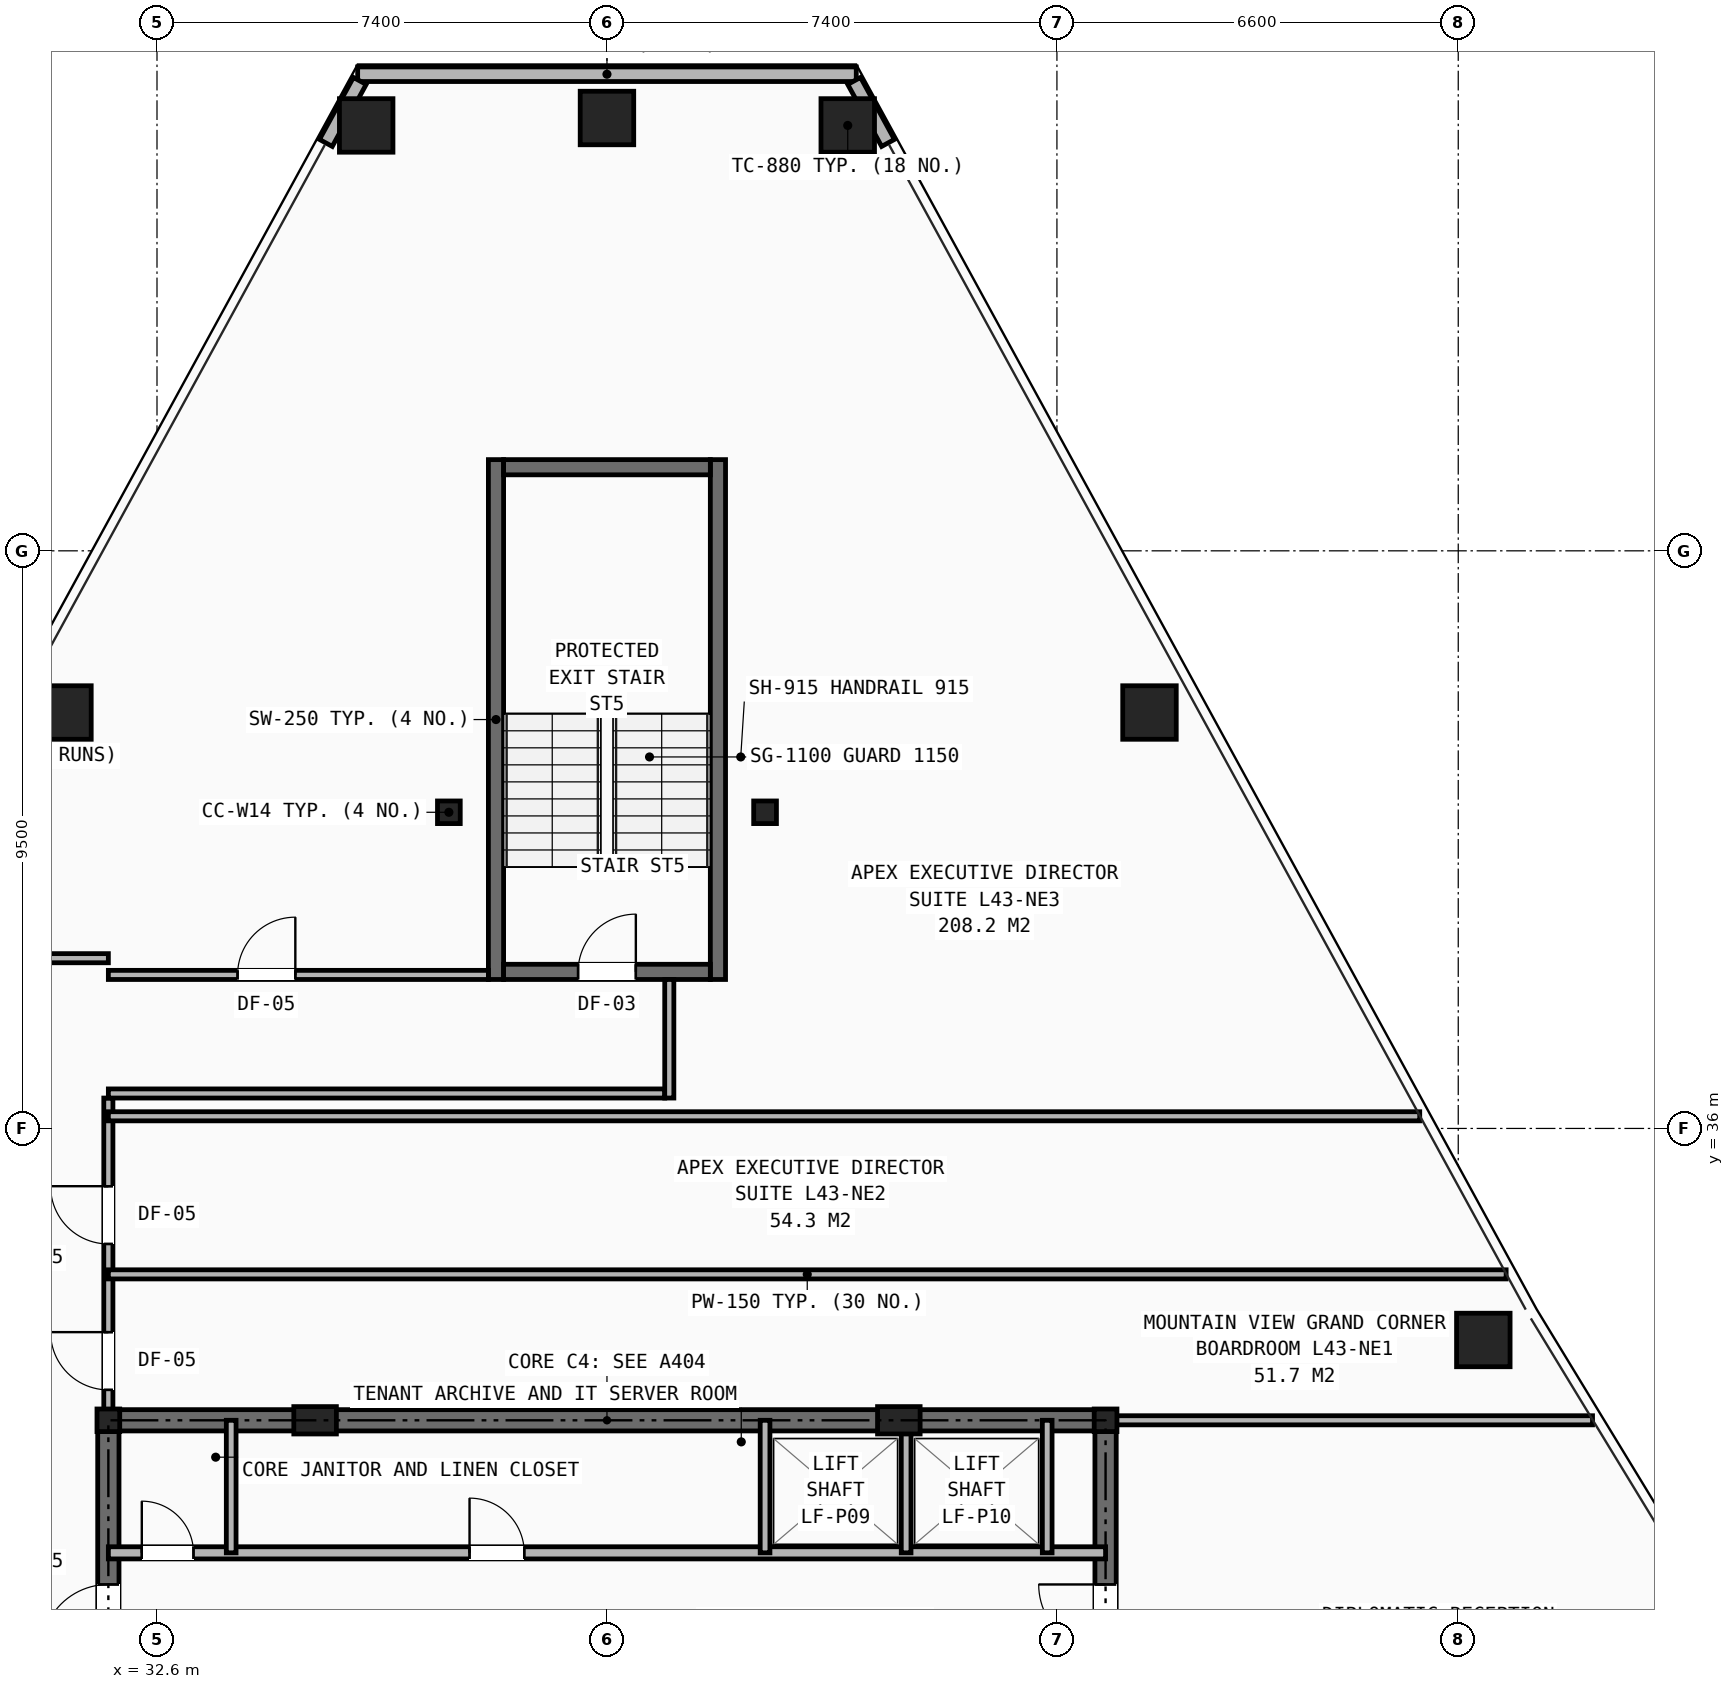
"""IFC4 building model, lengths in metres.
Left out: names, types, materials, properties, quantities, classifications, styles, units other than length and angle.
Written with IfcOpenShell. Run it as: python <this file> out.ifc"""

import sys

from ifc_helpers import new_model, si_unit, direction, frame, frame_2d, origin, origin_2d, place, context, subcontext, project, spatial, rectangle, hollow_rectangle, i_section, extrude, element, fill, save


model = new_model("IFC4")
c1 = context("Model", 3, precision=1e-05, world=origin(), true_north=direction((0.0, 1.0)))
c2 = subcontext(c1, "Body", "Model", "MODEL_VIEW")
j1 = project(units=[si_unit("LENGTHUNIT", "METRE"), si_unit("PLANEANGLEUNIT", "RADIAN")], contexts=[c1])
p1 = place(None, origin())
s1 = spatial("IfcSite", under=j1, at=p1, CompositionType="ELEMENT")
p2 = place(p1, origin())
s2 = spatial("IfcBuilding", under=s1, at=p2, CompositionType="ELEMENT")
p3 = place(p2, frame((0.0, 0.0, 150.5)))
s3 = spatial("IfcBuildingStorey", under=s2, at=p3, CompositionType="ELEMENT", Elevation=150.5)
for number, where, z_axis, x_axis in (
    (1, (31.8, 31.2, 0.0), (0.0, 0.0, 1.0), (1.0, 0.0, 0.0)),
    (2, (48.2, 31.2, 0.0), (0.0, 0.0, 1.0), (1.0, 0.0, 0.0)),
    (3, (37.4, 41.2, 0.0), (0.0, 0.0, 1.0), (1.0, 0.0, 0.0)),
    (4, (42.6, 41.2, 0.0), (0.0, 0.0, 1.0), (1.0, 0.0, 0.0)),
):
    element("IfcColumn", number, at=place(p3, frame(where, z_axis=z_axis, x_axis=x_axis)), inside=s3, PredefinedType="COLUMN", context=c2, shape_type="SweptSolid", body=[
        extrude(i_section(OverallWidth=0.374, OverallDepth=0.372, WebThickness=0.016, FlangeThickness=0.026, at=origin_2d()), origin(), (0.0, 0.0, 1.0), 3.45),
    ])
for number, where, z_axis, x_axis in (
    (5, (35.2, 31.2, 0.0), (0.0, 0.0, 1.0), (1.0, 0.0, 0.0)),
    (6, (44.8, 31.2, 0.0), (0.0, 0.0, 1.0), (1.0, 0.0, 0.0)),
):
    element("IfcColumn", number, at=place(p3, frame(where, z_axis=z_axis, x_axis=x_axis)), inside=s3, PredefinedType="PILASTER", context=c2, shape_type="SweptSolid", body=[
        extrude(rectangle(XDim=0.7, YDim=0.45, at=origin_2d()), origin(), (0.0, 0.0, 1.0), 3.45),
    ])
for number, where, z_axis, x_axis in (
    (7, (43.96, 52.496, 0.0), (0.0, 0.0, 1.0), (1.0, 0.0, 0.0)),
    (8, (40.0, 52.619, 0.0), (0.0, 0.0, 1.0), (1.0, 0.0, 0.0)),
    (9, (36.04, 52.496, 0.0), (0.0, 0.0, 1.0), (1.0, 0.0, 0.0)),
    (10, (31.078, 42.841, 0.0), (0.0, 0.0, 1.0), (1.0, 0.0, 0.0)),
    (11, (54.412, 32.521, 0.0), (0.0, 0.0, 1.0), (1.0, 0.0, 0.0)),
    (12, (48.922, 42.841, 0.0), (0.0, 0.0, 1.0), (1.0, 0.0, 0.0)),
):
    element("IfcColumn", number, at=place(p3, frame(where, z_axis=z_axis, x_axis=x_axis)), inside=s3, PredefinedType="COLUMN", context=c2, shape_type="SweptSolid", body=[
        extrude(hollow_rectangle(XDim=0.88, YDim=0.88, WallThickness=0.06, at=origin_2d()), origin(), (0.0, 0.0, 1.0), 3.45),
    ])
p4 = place(p3, frame((35.9, 53.339, 0.0), z_axis=(0.0, 0.0, 1.0), x_axis=(1.0, 0.0, 0.0)))
e13 = element("IfcWall", 13, at=p4, inside=s3, PredefinedType="SHEAR", context=c2, shape_type="SweptSolid", body=[
    extrude(rectangle(XDim=8.2, YDim=0.24, at=frame_2d((4.1, 0.0))), origin(), (0.0, 0.0, 1.0), 2.583),
])
for number, where, z_axis, x_axis in (
    (14, (35.935, 53.229, 0.0), (0.0, 0.0, 1.0), (-0.48, -0.878, 0.0)),
    (15, (44.623, 52.209, 0.0), (0.0, 0.0, 1.0), (-0.48, 0.878, 0.0)),
):
    element("IfcWall", number, at=place(p3, frame(where, z_axis=z_axis, x_axis=x_axis)), inside=s3, PredefinedType="SHEAR", context=c2, shape_type="SweptSolid", body=[
        extrude(rectangle(XDim=1.162, YDim=0.24, at=frame_2d((0.581, 0.0))), origin(), (0.0, 0.0, 1.0), 2.583),
    ])
p5 = place(p3, frame((31.8, 31.2, 0.0), z_axis=(0.0, 0.0, 1.0), x_axis=(1.0, 0.0, 0.0)))
e16 = element("IfcWall", 16, at=p5, inside=s3, PredefinedType="SHEAR", context=c2, shape_type="SweptSolid", body=[
    extrude(rectangle(XDim=16.4, YDim=0.35, at=frame_2d((8.2, 0.0))), origin(), (0.0, 0.0, 1.0), 3.21),
])
p6 = place(p3, frame((31.8, 16.4, 0.0), z_axis=(0.0, 0.0, 1.0), x_axis=(0.0, 1.0, 0.0)))
e17 = element("IfcWall", 17, at=p6, inside=s3, PredefinedType="SHEAR", context=c2, shape_type="SweptSolid", body=[
    extrude(rectangle(XDim=14.8, YDim=0.35, at=frame_2d((7.4, 0.0))), origin(), (0.0, 0.0, 1.0), 3.21),
])
p7 = place(p6, frame((11.0, 0.0, 0.0)))
e18 = element("IfcOpeningElement", 18, at=p7, cuts=e17, PredefinedType="OPENING", context=c2, shape_type="SweptSolid", body=[
    extrude(rectangle(XDim=1.1, YDim=2.15, at=frame_2d((0.55, 1.075))), frame((0.0, 0.185, 0.0), z_axis=(0.0, -1.0, 0.0), x_axis=(1.0, 0.0, 0.0)), (0.0, 0.0, 1.0), 0.37),
])
p8 = place(p3, frame((48.2, 16.4, 0.0), z_axis=(0.0, 0.0, 1.0), x_axis=(0.0, 1.0, 0.0)))
e19 = element("IfcWall", 19, at=p8, inside=s3, PredefinedType="SHEAR", context=c2, shape_type="SweptSolid", body=[
    extrude(rectangle(XDim=14.8, YDim=0.35, at=frame_2d((7.4, 0.0))), origin(), (0.0, 0.0, 1.0), 3.21),
])
p9 = place(p8, frame((11.0, 0.0, 0.0)))
e20 = element("IfcOpeningElement", 20, at=p9, cuts=e19, PredefinedType="OPENING", context=c2, shape_type="SweptSolid", body=[
    extrude(rectangle(XDim=1.1, YDim=2.15, at=frame_2d((0.55, 1.075))), frame((0.0, 0.185, 0.0), z_axis=(0.0, -1.0, 0.0), x_axis=(1.0, 0.0, 0.0)), (0.0, 0.0, 1.0), 0.37),
])
p10 = place(p3, frame((31.8, 29.02, 0.0), z_axis=(0.0, 0.0, 1.0), x_axis=(1.0, 0.0, 0.0)))
e21 = element("IfcWall", 21, at=p10, inside=s3, PredefinedType="SOLIDWALL", context=c2, shape_type="SweptSolid", body=[
    extrude(rectangle(XDim=16.4, YDim=0.2, at=frame_2d((8.2, 0.0))), origin(), (0.0, 0.0, 1.0), 2.661),
])
p11 = place(p10, frame((0.55, 0.0, 0.0)))
e22 = element("IfcOpeningElement", 22, at=p11, cuts=e21, PredefinedType="OPENING", context=c2, shape_type="SweptSolid", body=[
    extrude(rectangle(XDim=0.85, YDim=2.05, at=frame_2d((0.425, 1.025))), frame((0.0, 0.11, 0.0), z_axis=(0.0, -1.0, 0.0), x_axis=(1.0, 0.0, 0.0)), (0.0, 0.0, 1.0), 0.22),
])
p12 = place(p10, frame((5.94, 0.0, 0.0)))
e23 = element("IfcOpeningElement", 23, at=p12, cuts=e21, PredefinedType="OPENING", context=c2, shape_type="SweptSolid", body=[
    extrude(rectangle(XDim=0.9, YDim=2.1, at=frame_2d((0.45, 1.05))), frame((0.0, 0.11, 0.0), z_axis=(0.0, -1.0, 0.0), x_axis=(1.0, 0.0, 0.0)), (0.0, 0.0, 1.0), 0.22),
])
for number, where, z_axis, x_axis in (
    (24, (33.82, 29.02, 0.0), (0.0, 0.0, 1.0), (0.0, 1.0, 0.0)),
    (25, (42.6, 29.02, 0.0), (0.0, 0.0, 1.0), (0.0, 1.0, 0.0)),
    (26, (44.92, 29.02, 0.0), (0.0, 0.0, 1.0), (0.0, 1.0, 0.0)),
    (27, (47.24, 29.02, 0.0), (0.0, 0.0, 1.0), (0.0, 1.0, 0.0)),
):
    element("IfcWall", number, at=place(p3, frame(where, z_axis=z_axis, x_axis=x_axis)), inside=s3, PredefinedType="SOLIDWALL", context=c2, shape_type="SweptSolid", body=[
        extrude(rectangle(XDim=2.18, YDim=0.16, at=frame_2d((1.09, 0.0))), origin(), (0.0, 0.0, 1.0), 2.661),
    ])
p13 = place(p3, frame((31.8, 31.2, 0.0), z_axis=(0.0, 0.0, 1.0), x_axis=(0.0, 1.0, 0.0)))
e28 = element("IfcWall", 28, at=p13, inside=s3, PredefinedType="PARTITIONING", context=c2, shape_type="SweptSolid", body=[
    extrude(rectangle(XDim=5.3, YDim=0.15, at=frame_2d((2.65, 0.0))), origin(), (0.0, 0.0, 1.0), 2.252),
])
p14 = place(p13, frame((0.5, 0.0, 0.0)))
e29 = element("IfcOpeningElement", 29, at=p14, cuts=e28, PredefinedType="OPENING", context=c2, shape_type="SweptSolid", body=[
    extrude(rectangle(XDim=0.95, YDim=2.1, at=frame_2d((0.475, 1.05))), frame((0.0, 0.085, 0.0), z_axis=(0.0, -1.0, 0.0), x_axis=(1.0, 0.0, 0.0)), (0.0, 0.0, 1.0), 0.17),
])
p15 = place(p13, frame((2.9, 0.0, 0.0)))
e30 = element("IfcOpeningElement", 30, at=p15, cuts=e28, PredefinedType="OPENING", context=c2, shape_type="SweptSolid", body=[
    extrude(rectangle(XDim=0.95, YDim=2.1, at=frame_2d((0.475, 1.05))), frame((0.0, 0.085, 0.0), z_axis=(0.0, -1.0, 0.0), x_axis=(1.0, 0.0, 0.0)), (0.0, 0.0, 1.0), 0.17),
])
p16 = place(p3, frame((29.6, 38.8, 0.0), z_axis=(0.0, 0.0, 1.0), x_axis=(1.0, 0.0, 0.0)))
e31 = element("IfcWall", 31, at=p16, inside=s3, PredefinedType="PARTITIONING", context=c2, shape_type="SweptSolid", body=[
    extrude(rectangle(XDim=2.2, YDim=0.15, at=frame_2d((1.1, 0.0))), origin(), (0.0, 0.0, 1.0), 2.743),
])
p17 = place(p3, frame((48.2, 31.2, 0.0), z_axis=(0.0, 0.0, 1.0), x_axis=(1.0, 0.0, 0.0)))
e32 = element("IfcWall", 32, at=p17, inside=s3, PredefinedType="PARTITIONING", context=c2, shape_type="SweptSolid", body=[
    extrude(rectangle(XDim=8.008, YDim=0.15, at=frame_2d((4.004, 0.0))), origin(), (0.0, 0.0, 1.0), 2.252),
])
p18 = place(p3, frame((31.8, 33.6, 0.0), z_axis=(0.0, 0.0, 1.0), x_axis=(1.0, 0.0, 0.0)))
e33 = element("IfcWall", 33, at=p18, inside=s3, PredefinedType="PARTITIONING", context=c2, shape_type="SweptSolid", body=[
    extrude(rectangle(XDim=22.988, YDim=0.15, at=frame_2d((11.494, 0.0))), origin(), (0.0, 0.0, 1.0), 2.589),
])
p19 = place(p3, frame((31.8, 36.2, 0.0), z_axis=(0.0, 0.0, 1.0), x_axis=(1.0, 0.0, 0.0)))
e34 = element("IfcWall", 34, at=p19, inside=s3, PredefinedType="PARTITIONING", context=c2, shape_type="SweptSolid", body=[
    extrude(rectangle(XDim=21.567, YDim=0.15, at=frame_2d((10.783, 0.0))), origin(), (0.0, 0.0, 1.0), 2.589),
])
for number, where, z_axis, x_axis in (
    (35, (38.175, 38.45, 0.0), (0.0, 0.0, 1.0), (0.0, 1.0, 0.0)),
    (36, (41.825, 38.45, 0.0), (0.0, 0.0, 1.0), (0.0, 1.0, 0.0)),
):
    element("IfcWall", number, at=place(p3, frame(where, z_axis=z_axis, x_axis=x_axis)), inside=s3, PredefinedType="SHEAR", context=c2, shape_type="SweptSolid", body=[
        extrude(rectangle(XDim=8.55, YDim=0.25, at=frame_2d((4.275, 0.0))), origin(), (0.0, 0.0, 1.0), 3.21),
    ])
p20 = place(p3, frame((38.3, 38.575, 0.0), z_axis=(0.0, 0.0, 1.0), x_axis=(1.0, 0.0, 0.0)))
e37 = element("IfcWall", 37, at=p20, inside=s3, PredefinedType="SHEAR", context=c2, shape_type="SweptSolid", body=[
    extrude(rectangle(XDim=3.4, YDim=0.25, at=frame_2d((1.7, 0.0))), origin(), (0.0, 0.0, 1.0), 3.21),
])
p21 = place(p20, frame((1.225, 0.0, 0.0)))
e38 = element("IfcOpeningElement", 38, at=p21, cuts=e37, PredefinedType="OPENING", context=c2, shape_type="SweptSolid", body=[
    extrude(rectangle(XDim=0.95, YDim=2.1, at=frame_2d((0.475, 1.05))), frame((0.0, 0.135, 0.0), z_axis=(0.0, -1.0, 0.0), x_axis=(1.0, 0.0, 0.0)), (0.0, 0.0, 1.0), 0.27),
])
p22 = place(p3, frame((38.3, 46.875, 0.0), z_axis=(0.0, 0.0, 1.0), x_axis=(1.0, 0.0, 0.0)))
e39 = element("IfcWall", 39, at=p22, inside=s3, PredefinedType="SHEAR", context=c2, shape_type="SweptSolid", body=[
    extrude(rectangle(XDim=3.4, YDim=0.25, at=frame_2d((1.7, 0.0))), origin(), (0.0, 0.0, 1.0), 3.21),
])
p23 = place(p3, frame((31.8, 36.575, 0.0), z_axis=(0.0, 0.0, 1.0), x_axis=(1.0, 0.0, 0.0)))
e40 = element("IfcWall", 40, at=p23, inside=s3, PredefinedType="PARTITIONING", context=c2, shape_type="SweptSolid", body=[
    extrude(rectangle(XDim=9.15, YDim=0.15, at=frame_2d((4.575, 0.0))), origin(), (0.0, 0.0, 1.0), 3.21),
])
p24 = place(p3, frame((31.8, 38.525, 0.0), z_axis=(0.0, 0.0, 1.0), x_axis=(1.0, 0.0, 0.0)))
e41 = element("IfcWall", 41, at=p24, inside=s3, PredefinedType="PARTITIONING", context=c2, shape_type="SweptSolid", body=[
    extrude(rectangle(XDim=6.25, YDim=0.15, at=frame_2d((3.125, 0.0))), origin(), (0.0, 0.0, 1.0), 2.743),
])
p25 = place(p24, frame((2.125, 0.0, 0.0)))
e42 = element("IfcOpeningElement", 42, at=p25, cuts=e41, PredefinedType="OPENING", context=c2, shape_type="SweptSolid", body=[
    extrude(rectangle(XDim=0.95, YDim=2.1, at=frame_2d((0.475, 1.05))), frame((0.0, 0.085, 0.0), z_axis=(0.0, -1.0, 0.0), x_axis=(1.0, 0.0, 0.0)), (0.0, 0.0, 1.0), 0.17),
])
p26 = place(p3, frame((41.025, 36.5, 0.0), z_axis=(0.0, 0.0, 1.0), x_axis=(0.0, 1.0, 0.0)))
e43 = element("IfcWall", 43, at=p26, inside=s3, PredefinedType="PARTITIONING", context=c2, shape_type="SweptSolid", body=[
    extrude(rectangle(XDim=1.95, YDim=0.15, at=frame_2d((0.975, 0.0))), origin(), (0.0, 0.0, 1.0), 3.21),
])
p27 = place(p11, origin())
e44 = element("IfcDoor", 44, at=p27, inside=s3, OperationType="SINGLE_SWING_LEFT", PredefinedType="DOOR", context=c2, shape_type="SweptSolid", body=[
    extrude(rectangle(XDim=0.85, YDim=2.05, at=frame_2d((0.425, 1.025))), frame((0.0, 0.025, 0.0), z_axis=(0.0, -1.0, 0.0), x_axis=(1.0, 0.0, 0.0)), (0.0, 0.0, 1.0), 0.05),
])
fill(e22, e44)
p28 = place(p7, origin())
e45 = element("IfcDoor", 45, at=p28, inside=s3, OperationType="SINGLE_SWING_LEFT", PredefinedType="DOOR", context=c2, shape_type="SweptSolid", body=[
    extrude(rectangle(XDim=1.1, YDim=2.15, at=frame_2d((0.55, 1.075))), frame((0.0, 0.025, 0.0), z_axis=(0.0, -1.0, 0.0), x_axis=(1.0, 0.0, 0.0)), (0.0, 0.0, 1.0), 0.05),
])
fill(e18, e45)
p29 = place(p9, origin())
e46 = element("IfcDoor", 46, at=p29, inside=s3, OperationType="SINGLE_SWING_RIGHT", PredefinedType="DOOR", context=c2, shape_type="SweptSolid", body=[
    extrude(rectangle(XDim=1.1, YDim=2.15, at=frame_2d((0.55, 1.075))), frame((0.0, 0.025, 0.0), z_axis=(0.0, -1.0, 0.0), x_axis=(1.0, 0.0, 0.0)), (0.0, 0.0, 1.0), 0.05),
])
fill(e20, e46)
p30 = place(p12, origin())
e47 = element("IfcDoor", 47, at=p30, inside=s3, OperationType="SINGLE_SWING_LEFT", PredefinedType="DOOR", context=c2, shape_type="SweptSolid", body=[
    extrude(rectangle(XDim=0.9, YDim=2.1, at=frame_2d((0.45, 1.05))), frame((0.0, 0.025, 0.0), z_axis=(0.0, -1.0, 0.0), x_axis=(1.0, 0.0, 0.0)), (0.0, 0.0, 1.0), 0.05),
])
fill(e23, e47)
p31 = place(p14, origin())
e48 = element("IfcDoor", 48, at=p31, inside=s3, OperationType="SINGLE_SWING_RIGHT", PredefinedType="DOOR", context=c2, shape_type="SweptSolid", body=[
    extrude(rectangle(XDim=0.95, YDim=2.1, at=frame_2d((0.475, 1.05))), frame((0.0, 0.025, 0.0), z_axis=(0.0, -1.0, 0.0), x_axis=(1.0, 0.0, 0.0)), (0.0, 0.0, 1.0), 0.05),
])
fill(e29, e48)
p32 = place(p15, origin())
e49 = element("IfcDoor", 49, at=p32, inside=s3, OperationType="SINGLE_SWING_RIGHT", PredefinedType="DOOR", context=c2, shape_type="SweptSolid", body=[
    extrude(rectangle(XDim=0.95, YDim=2.1, at=frame_2d((0.475, 1.05))), frame((0.0, 0.025, 0.0), z_axis=(0.0, -1.0, 0.0), x_axis=(1.0, 0.0, 0.0)), (0.0, 0.0, 1.0), 0.05),
])
fill(e30, e49)
p33 = place(p25, origin())
e50 = element("IfcDoor", 50, at=p33, inside=s3, OperationType="SINGLE_SWING_RIGHT", PredefinedType="DOOR", context=c2, shape_type="SweptSolid", body=[
    extrude(rectangle(XDim=0.95, YDim=2.1, at=frame_2d((0.475, 1.05))), frame((0.0, 0.025, 0.0), z_axis=(0.0, -1.0, 0.0), x_axis=(1.0, 0.0, 0.0)), (0.0, 0.0, 1.0), 0.05),
])
fill(e42, e50)
p34 = place(p21, origin())
e51 = element("IfcDoor", 51, at=p34, inside=s3, OperationType="SINGLE_SWING_RIGHT", PredefinedType="DOOR", context=c2, shape_type="SweptSolid", body=[
    extrude(rectangle(XDim=0.95, YDim=2.1, at=frame_2d((0.475, 1.05))), frame((0.0, 0.025, 0.0), z_axis=(0.0, -1.0, 0.0), x_axis=(1.0, 0.0, 0.0)), (0.0, 0.0, 1.0), 0.05),
])
fill(e38, e51)
save(model, sys.argv[1])
